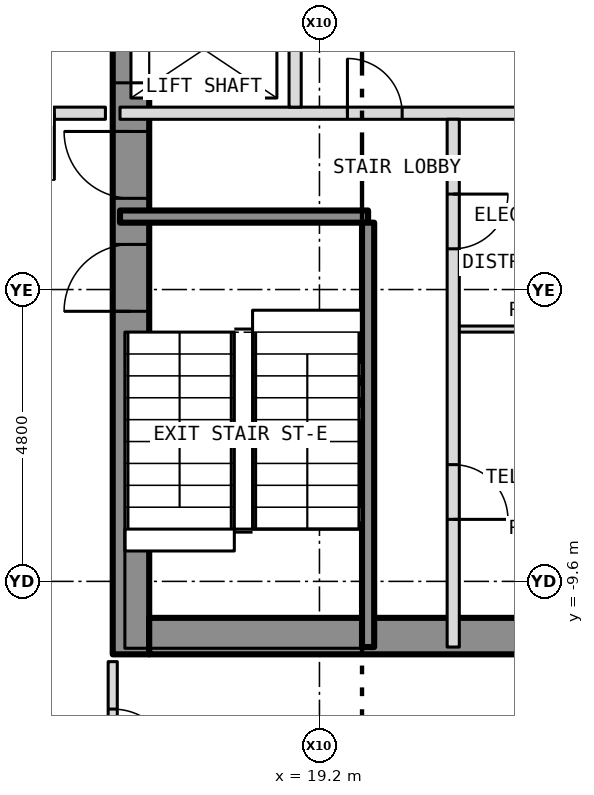
"""IFC4 building model, lengths in metres.
Left out: names, types, materials, properties, quantities, classifications, styles, units other than length and angle.
Written with IfcOpenShell. Run it as: python <this file> out.ifc"""

import sys

from ifc_helpers import new_model, si_unit, direction, frame, frame_2d, origin, place, context, subcontext, project, spatial, rectangle, extrude, element, fill, save


model = new_model("IFC4")
c1 = context("Model", 3, precision=1e-05, world=origin(), true_north=direction((0.0, 1.0)))
c2 = subcontext(c1, "Body", "Model", "MODEL_VIEW")
j1 = project(units=[si_unit("LENGTHUNIT", "METRE"), si_unit("PLANEANGLEUNIT", "RADIAN")], contexts=[c1])
p1 = place(None, origin())
s1 = spatial("IfcSite", under=j1, at=p1, CompositionType="ELEMENT")
p2 = place(p1, origin())
s2 = spatial("IfcBuilding", under=s1, at=p2, CompositionType="ELEMENT")
p3 = place(p2, frame((0.0, 0.0, 67.0)))
s3 = spatial("IfcBuildingStorey", under=s2, at=p3, CompositionType="ELEMENT", Elevation=67.0)
p4 = place(p3, frame((16.1, -10.8, 0.0), z_axis=(0.0, 0.0, 1.0), x_axis=(0.0, 1.0, 0.0)))
e1 = element("IfcWall", 1, at=p4, inside=s3, PredefinedType="SHEAR", context=c2, shape_type="SweptSolid", body=[
    extrude(rectangle(XDim=21.6, YDim=0.6, at=frame_2d((10.8, 0.0))), origin(), (0.0, 0.0, 1.0), 3.25),
])
p5 = place(p4, frame((9.4, 0.0, 0.0)))
e2 = element("IfcOpeningElement", 2, at=p5, cuts=e1, PredefinedType="OPENING", context=c2, shape_type="SweptSolid", body=[
    extrude(rectangle(XDim=1.1, YDim=2.1, at=frame_2d((0.55, 1.05))), frame((0.0, 0.312, 0.0), z_axis=(0.0, -1.0, 0.0), x_axis=(1.0, 0.0, 0.0)), (0.0, 0.0, 1.0), 0.624),
])
p6 = place(p4, frame((11.5, 0.0, 0.0)))
e3 = element("IfcOpeningElement", 3, at=p6, cuts=e1, PredefinedType="OPENING", context=c2, shape_type="SweptSolid", body=[
    extrude(rectangle(XDim=1.1, YDim=2.1, at=frame_2d((0.55, 1.05))), frame((0.0, 0.312, 0.0), z_axis=(0.0, -1.0, 0.0), x_axis=(1.0, 0.0, 0.0)), (0.0, 0.0, 1.0), 0.624),
])
p7 = place(p4, frame((13.6, 0.0, 0.0)))
e4 = element("IfcOpeningElement", 4, at=p7, cuts=e1, PredefinedType="OPENING", context=c2, shape_type="SweptSolid", body=[
    extrude(rectangle(XDim=1.1, YDim=2.1, at=frame_2d((0.55, 1.05))), frame((0.0, 0.312, 0.0), z_axis=(0.0, -1.0, 0.0), x_axis=(1.0, 0.0, 0.0)), (0.0, 0.0, 1.0), 0.624),
])
p8 = place(p4, frame((15.7, 0.0, 0.0)))
e5 = element("IfcOpeningElement", 5, at=p8, cuts=e1, PredefinedType="OPENING", context=c2, shape_type="SweptSolid", body=[
    extrude(rectangle(XDim=1.1, YDim=2.1, at=frame_2d((0.55, 1.05))), frame((0.0, 0.312, 0.0), z_axis=(0.0, -1.0, 0.0), x_axis=(1.0, 0.0, 0.0)), (0.0, 0.0, 1.0), 0.624),
])
p9 = place(p4, frame((17.8, 0.0, 0.0)))
e6 = element("IfcOpeningElement", 6, at=p9, cuts=e1, PredefinedType="OPENING", context=c2, shape_type="SweptSolid", body=[
    extrude(rectangle(XDim=1.1, YDim=2.1, at=frame_2d((0.55, 1.05))), frame((0.0, 0.312, 0.0), z_axis=(0.0, -1.0, 0.0), x_axis=(1.0, 0.0, 0.0)), (0.0, 0.0, 1.0), 0.624),
])
p10 = place(p4, frame((5.642, 0.0, 0.0)))
e7 = element("IfcOpeningElement", 7, at=p10, cuts=e1, PredefinedType="OPENING", context=c2, shape_type="SweptSolid", body=[
    extrude(rectangle(XDim=1.1, YDim=2.1, at=frame_2d((0.55, 1.05))), frame((0.0, 0.312, 0.0), z_axis=(0.0, -1.0, 0.0), x_axis=(1.0, 0.0, 0.0)), (0.0, 0.0, 1.0), 0.624),
])
p11 = place(p4, frame((7.5, 0.0, 0.0)))
e8 = element("IfcOpeningElement", 8, at=p11, cuts=e1, PredefinedType="OPENING", context=c2, shape_type="SweptSolid", body=[
    extrude(rectangle(XDim=1.1, YDim=2.1, at=frame_2d((0.55, 1.05))), frame((0.0, 0.312, 0.0), z_axis=(0.0, -1.0, 0.0), x_axis=(1.0, 0.0, 0.0)), (0.0, 0.0, 1.0), 0.624),
])
p12 = place(p3, frame((16.4, -10.5, 0.0), z_axis=(0.0, 0.0, 1.0), x_axis=(1.0, 0.0, 0.0)))
e9 = element("IfcWall", 9, at=p12, inside=s3, PredefinedType="SHEAR", context=c2, shape_type="SweptSolid", body=[
    extrude(rectangle(XDim=7.0, YDim=0.6, at=frame_2d((3.5, 0.0))), origin(), (0.0, 0.0, 1.0), 3.25),
])
p13 = place(p3, frame((21.4, -5.45, 0.0), z_axis=(0.0, 0.0, 1.0), x_axis=(1.0, 0.0, 0.0)))
e10 = element("IfcWall", 10, at=p13, inside=s3, PredefinedType="PARTITIONING", context=c2, shape_type="SweptSolid", body=[
    extrude(rectangle(XDim=2.48, YDim=0.1, at=frame_2d((1.24, 0.0))), origin(), (0.0, 0.0, 1.0), 3.25),
])
p14 = place(p3, frame((15.92, -3.6, 0.0), z_axis=(0.0, 0.0, 1.0), x_axis=(1.0, 0.0, 0.0)))
e11 = element("IfcWall", 11, at=p14, inside=s3, PredefinedType="SHEAR", context=c2, shape_type="SweptSolid", body=[
    extrude(rectangle(XDim=4.08, YDim=0.2, at=frame_2d((2.04, 0.0))), origin(), (0.0, 0.0, 1.0), 3.25),
])
p15 = place(p3, frame((12.4, -1.9, 0.0), z_axis=(0.0, 0.0, 1.0), x_axis=(1.0, 0.0, 0.0)))
e12 = element("IfcWall", 12, at=p15, inside=s3, PredefinedType="PARTITIONING", context=c2, shape_type="SweptSolid", body=[
    extrude(rectangle(XDim=3.28, YDim=0.2, at=frame_2d((1.64, 0.0))), origin(), (0.0, 0.0, 1.0), 3.35),
])
p16 = place(p15, frame((1.34, 0.0, 0.0)))
e13 = element("IfcOpeningElement", 13, at=p16, cuts=e12, PredefinedType="OPENING", context=c2, shape_type="SweptSolid", body=[
    extrude(rectangle(XDim=1.1, YDim=2.1, at=frame_2d((0.55, 1.05))), frame((0.0, 0.112, 0.0), z_axis=(0.0, -1.0, 0.0), x_axis=(1.0, 0.0, 0.0)), (0.0, 0.0, 1.0), 0.224),
])
p17 = place(p3, frame((15.92, -1.9, 0.0), z_axis=(0.0, 0.0, 1.0), x_axis=(1.0, 0.0, 0.0)))
e14 = element("IfcWall", 14, at=p17, inside=s3, PredefinedType="PARTITIONING", context=c2, shape_type="SweptSolid", body=[
    extrude(rectangle(XDim=7.96, YDim=0.2, at=frame_2d((3.98, 0.0))), origin(), (0.0, 0.0, 1.0), 3.25),
])
p18 = place(p17, frame((3.74, 0.0, 0.0)))
e15 = element("IfcOpeningElement", 15, at=p18, cuts=e14, PredefinedType="OPENING", context=c2, shape_type="SweptSolid", body=[
    extrude(rectangle(XDim=0.9, YDim=2.1, at=frame_2d((0.45, 1.05))), frame((0.0, 0.112, 0.0), z_axis=(0.0, -1.0, 0.0), x_axis=(1.0, 0.0, 0.0)), (0.0, 0.0, 1.0), 0.224),
])
p19 = place(p3, frame((15.8, -15.725, 0.0), z_axis=(0.0, 0.0, 1.0), x_axis=(0.0, 1.0, 0.0)))
e16 = element("IfcWall", 16, at=p19, inside=s3, PredefinedType="PARTITIONING", context=c2, shape_type="SweptSolid", body=[
    extrude(rectangle(XDim=4.805, YDim=0.15, at=frame_2d((2.403, 0.0))), origin(), (0.0, 0.0, 1.0), 3.35),
])
p20 = place(p19, frame((3.025, 0.0, 0.0)))
e17 = element("IfcOpeningElement", 17, at=p20, cuts=e16, PredefinedType="OPENING", context=c2, shape_type="SweptSolid", body=[
    extrude(rectangle(XDim=1.0, YDim=2.1, at=frame_2d((0.5, 1.05))), frame((0.0, 0.087, 0.0), z_axis=(0.0, -1.0, 0.0), x_axis=(1.0, 0.0, 0.0)), (0.0, 0.0, 1.0), 0.174),
])
p21 = place(p3, frame((18.8, -1.8, 0.0), z_axis=(0.0, 0.0, 1.0), x_axis=(0.0, 1.0, 0.0)))
e18 = element("IfcWall", 18, at=p21, inside=s3, PredefinedType="PARTITIONING", context=c2, shape_type="SweptSolid", body=[
    extrude(rectangle(XDim=12.48, YDim=0.2, at=frame_2d((6.24, 0.0))), origin(), (0.0, 0.0, 1.0), 3.25),
])
p22 = place(p3, frame((20.0, -10.68, 0.0), z_axis=(0.0, 0.0, 1.0), x_axis=(0.0, 1.0, 0.0)))
e19 = element("IfcWall", 19, at=p22, inside=s3, PredefinedType="SHEAR", context=c2, shape_type="SweptSolid", body=[
    extrude(rectangle(XDim=6.98, YDim=0.2, at=frame_2d((3.49, 0.0))), origin(), (0.0, 0.0, 1.0), 3.25),
])
p23 = place(p3, frame((21.4, -10.68, 0.0), z_axis=(0.0, 0.0, 1.0), x_axis=(0.0, 1.0, 0.0)))
e20 = element("IfcWall", 20, at=p23, inside=s3, PredefinedType="PARTITIONING", context=c2, shape_type="SweptSolid", body=[
    extrude(rectangle(XDim=8.68, YDim=0.2, at=frame_2d((4.34, 0.0))), origin(), (0.0, 0.0, 1.0), 3.25),
])
p24 = place(p23, frame((2.1, 0.0, 0.0)))
e21 = element("IfcOpeningElement", 21, at=p24, cuts=e20, PredefinedType="OPENING", context=c2, shape_type="SweptSolid", body=[
    extrude(rectangle(XDim=0.9, YDim=2.1, at=frame_2d((0.45, 1.05))), frame((0.0, 0.112, 0.0), z_axis=(0.0, -1.0, 0.0), x_axis=(1.0, 0.0, 0.0)), (0.0, 0.0, 1.0), 0.224),
])
p25 = place(p23, frame((6.55, 0.0, 0.0)))
e22 = element("IfcOpeningElement", 22, at=p25, cuts=e20, PredefinedType="OPENING", context=c2, shape_type="SweptSolid", body=[
    extrude(rectangle(XDim=0.9, YDim=2.1, at=frame_2d((0.45, 1.05))), frame((0.0, 0.112, 0.0), z_axis=(0.0, -1.0, 0.0), x_axis=(1.0, 0.0, 0.0)), (0.0, 0.0, 1.0), 0.224),
])
p26 = place(p5, origin())
e23 = element("IfcDoor", 23, at=p26, inside=s3, OperationType="SLIDING_TO_LEFT", PredefinedType="DOOR", context=c2, shape_type="SweptSolid", body=[
    extrude(rectangle(XDim=1.1, YDim=2.1, at=frame_2d((0.55, 1.05))), frame((0.0, 0.025, 0.0), z_axis=(0.0, -1.0, 0.0), x_axis=(1.0, 0.0, 0.0)), (0.0, 0.0, 1.0), 0.05),
])
fill(e2, e23)
p27 = place(p10, origin())
e24 = element("IfcDoor", 24, at=p27, inside=s3, OperationType="SINGLE_SWING_LEFT", PredefinedType="DOOR", context=c2, shape_type="SweptSolid", body=[
    extrude(rectangle(XDim=1.1, YDim=2.1, at=frame_2d((0.55, 1.05))), frame((0.0, 0.025, 0.0), z_axis=(0.0, -1.0, 0.0), x_axis=(1.0, 0.0, 0.0)), (0.0, 0.0, 1.0), 0.05),
])
fill(e7, e24)
p28 = place(p11, origin())
e25 = element("IfcDoor", 25, at=p28, inside=s3, OperationType="SINGLE_SWING_RIGHT", PredefinedType="DOOR", context=c2, shape_type="SweptSolid", body=[
    extrude(rectangle(XDim=1.1, YDim=2.1, at=frame_2d((0.55, 1.05))), frame((0.0, 0.025, 0.0), z_axis=(0.0, -1.0, 0.0), x_axis=(1.0, 0.0, 0.0)), (0.0, 0.0, 1.0), 0.05),
])
fill(e8, e25)
p29 = place(p24, origin())
e26 = element("IfcDoor", 26, at=p29, inside=s3, OperationType="SINGLE_SWING_LEFT", PredefinedType="DOOR", context=c2, shape_type="SweptSolid", body=[
    extrude(rectangle(XDim=0.9, YDim=2.1, at=frame_2d((0.45, 1.05))), frame((0.0, 0.025, 0.0), z_axis=(0.0, -1.0, 0.0), x_axis=(1.0, 0.0, 0.0)), (0.0, 0.0, 1.0), 0.05),
])
fill(e21, e26)
p30 = place(p25, origin())
e27 = element("IfcDoor", 27, at=p30, inside=s3, OperationType="SINGLE_SWING_RIGHT", PredefinedType="DOOR", context=c2, shape_type="SweptSolid", body=[
    extrude(rectangle(XDim=0.9, YDim=2.1, at=frame_2d((0.45, 1.05))), frame((0.0, 0.025, 0.0), z_axis=(0.0, -1.0, 0.0), x_axis=(1.0, 0.0, 0.0)), (0.0, 0.0, 1.0), 0.05),
])
fill(e22, e27)
p31 = place(p18, origin())
e28 = element("IfcDoor", 28, at=p31, inside=s3, OperationType="SINGLE_SWING_LEFT", PredefinedType="DOOR", context=c2, shape_type="SweptSolid", body=[
    extrude(rectangle(XDim=0.9, YDim=2.1, at=frame_2d((0.45, 1.05))), frame((0.0, 0.025, 0.0), z_axis=(0.0, -1.0, 0.0), x_axis=(1.0, 0.0, 0.0)), (0.0, 0.0, 1.0), 0.05),
])
fill(e15, e28)
p32 = place(p16, origin())
e29 = element("IfcDoor", 29, at=p32, inside=s3, OperationType="SINGLE_SWING_RIGHT", PredefinedType="DOOR", context=c2, shape_type="SweptSolid", body=[
    extrude(rectangle(XDim=1.1, YDim=2.1, at=frame_2d((0.55, 1.05))), frame((0.0, 0.025, 0.0), z_axis=(0.0, -1.0, 0.0), x_axis=(1.0, 0.0, 0.0)), (0.0, 0.0, 1.0), 0.05),
])
fill(e13, e29)
p33 = place(p20, origin())
e30 = element("IfcDoor", 30, at=p33, inside=s3, OperationType="SINGLE_SWING_LEFT", PredefinedType="DOOR", context=c2, shape_type="SweptSolid", body=[
    extrude(rectangle(XDim=1.0, YDim=2.1, at=frame_2d((0.5, 1.05))), frame((0.0, 0.025, 0.0), z_axis=(0.0, -1.0, 0.0), x_axis=(1.0, 0.0, 0.0)), (0.0, 0.0, 1.0), 0.05),
])
fill(e17, e30)
save(model, sys.argv[1])
